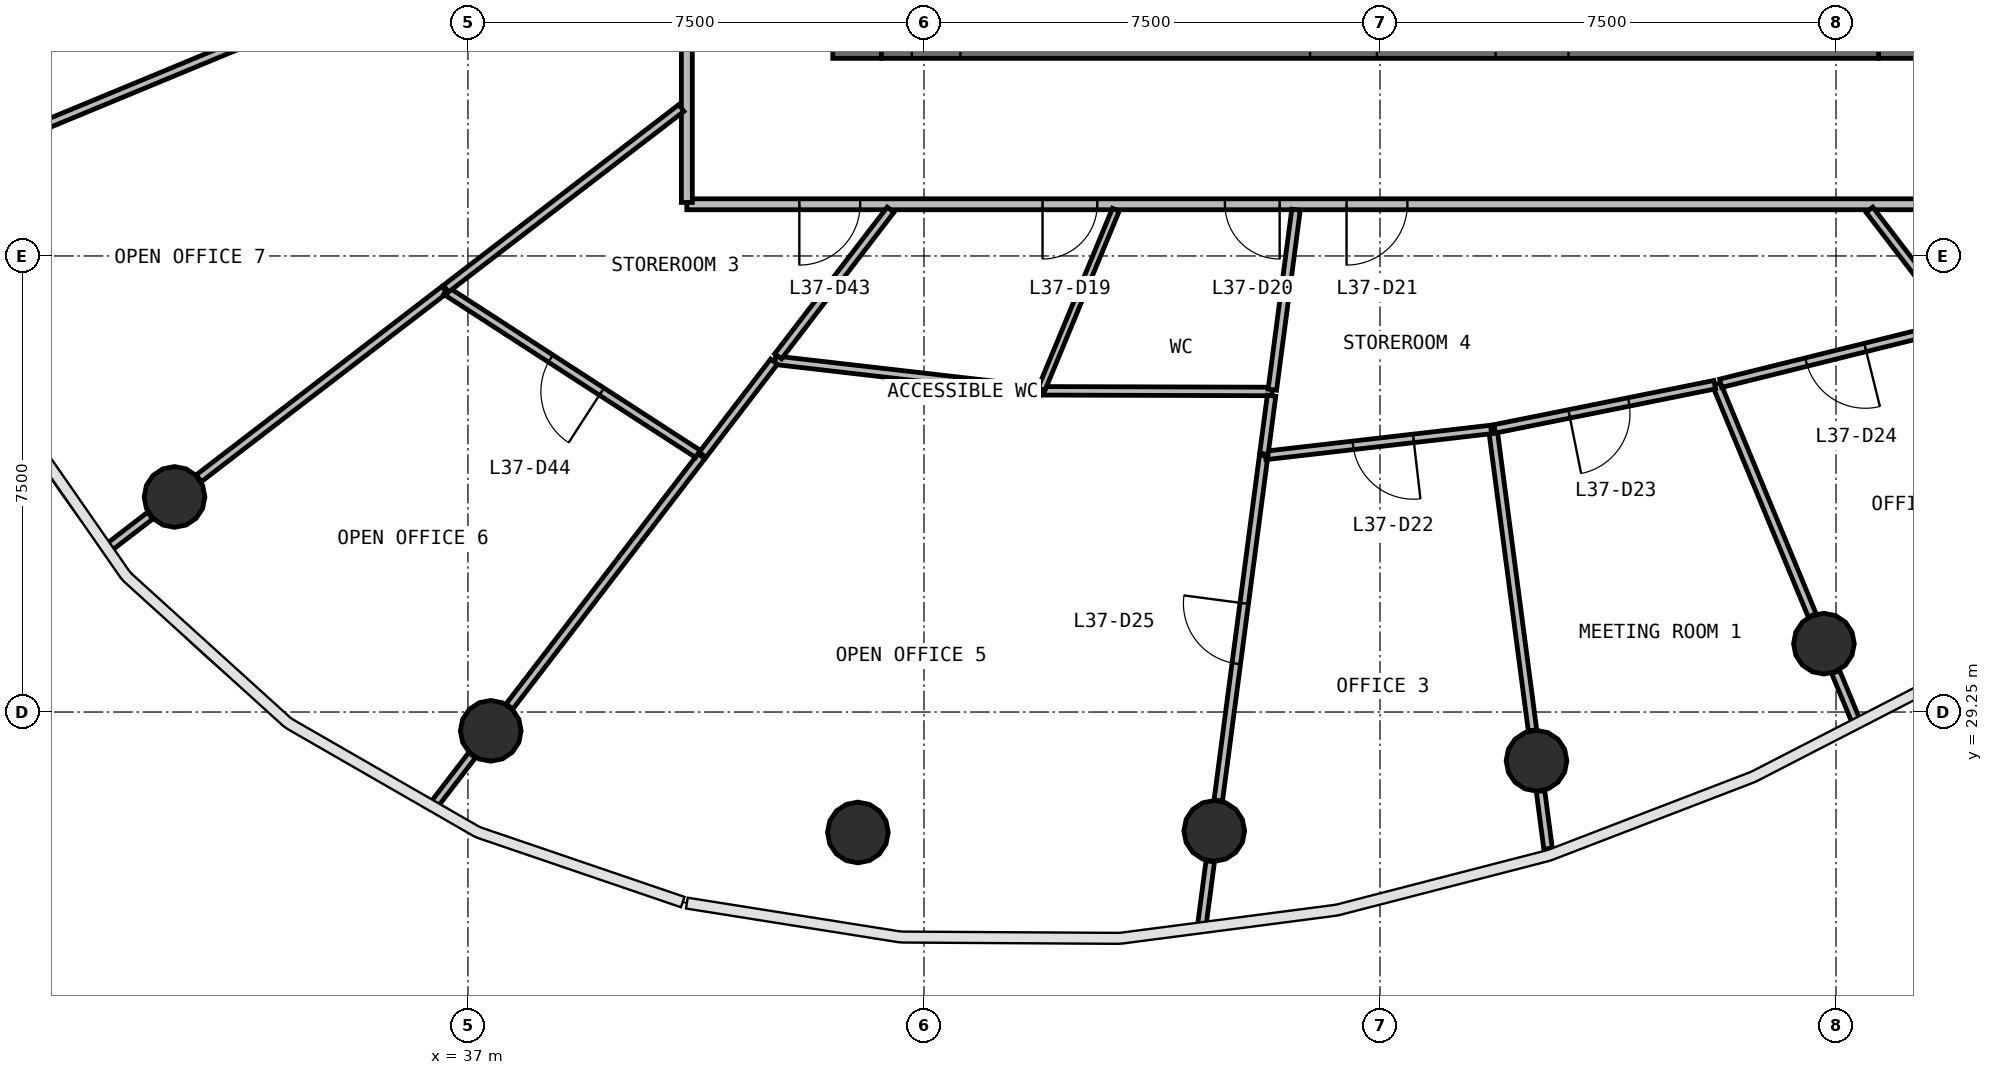
"""IFC4 building model, lengths in metres.
Left out: names, types, materials, properties, quantities, classifications, styles, units other than length and angle.
Written with IfcOpenShell. Run it as: python <this file> out.ifc"""

import sys

from ifc_helpers import new_model, si_unit, direction, frame, frame_2d, origin, origin_2d, place, context, subcontext, project, spatial, rectangle, circle, extrude, source, transform, mapped, element, fill, save


model = new_model("IFC4")
c1 = context("Model", 3, precision=1e-05, world=origin(), true_north=direction((0.0, 1.0)))
c2 = subcontext(c1, "Body", "Model", "MODEL_VIEW")
j1 = project(units=[si_unit("LENGTHUNIT", "METRE"), si_unit("PLANEANGLEUNIT", "RADIAN")], contexts=[c1])
p1 = place(None, origin())
s1 = spatial("IfcSite", under=j1, at=p1, CompositionType="ELEMENT")
p2 = place(p1, origin())
s2 = spatial("IfcBuilding", under=s1, at=p2, CompositionType="ELEMENT")
p3 = place(p2, frame((0.0, 0.0, 156.5)))
s3 = spatial("IfcBuildingStorey", under=s2, at=p3, CompositionType="ELEMENT", Elevation=156.5)
p4 = place(p3, frame((60.6, 40.0, 0.0), z_axis=(0.0, 0.0, 1.0), x_axis=(0.0, 1.0, 0.0)))
e1 = element("IfcWall", 1, at=p4, inside=s3, PredefinedType="SHEAR", context=c2, shape_type="SweptSolid", body=[
    extrude(rectangle(XDim=16.0, YDim=0.8, at=frame_2d((8.0, 0.0))), origin(), (0.0, 0.0, 1.0), 3.9),
])
p5 = place(p4, frame((7.1, 0.0, 0.0)))
e2 = element("IfcOpeningElement", 2, at=p5, cuts=e1, PredefinedType="OPENING", context=c2, shape_type="SweptSolid", body=[
    extrude(rectangle(XDim=1.8, YDim=2.1, at=frame_2d((0.9, 1.05))), frame((0.0, 0.41, 0.0), z_axis=(0.0, -1.0, 0.0), x_axis=(1.0, 0.0, 0.0)), (0.0, 0.0, 1.0), 0.82),
])
p6 = place(p3, frame((43.4, 56.0, 0.0), z_axis=(0.0, 0.0, 1.0), x_axis=(0.0, -1.0, 0.0)))
e3 = element("IfcWall", 3, at=p6, inside=s3, PredefinedType="SHEAR", context=c2, shape_type="SweptSolid", body=[
    extrude(rectangle(XDim=16.0, YDim=0.8, at=frame_2d((8.0, 0.0))), origin(), (0.0, 0.0, 1.0), 3.9),
])
p7 = place(p6, frame((7.1, 0.0, 0.0)))
e4 = element("IfcOpeningElement", 4, at=p7, cuts=e3, PredefinedType="OPENING", context=c2, shape_type="SweptSolid", body=[
    extrude(rectangle(XDim=1.8, YDim=2.1, at=frame_2d((0.9, 1.05))), frame((0.0, 0.41, 0.0), z_axis=(0.0, -1.0, 0.0), x_axis=(1.0, 0.0, 0.0)), (0.0, 0.0, 1.0), 0.82),
])
p8 = place(p3, frame((43.8, 40.4, 0.0), z_axis=(0.0, 0.0, 1.0), x_axis=(1.0, 0.0, 0.0)))
e5 = element("IfcWall", 5, at=p8, inside=s3, PredefinedType="SHEAR", context=c2, shape_type="SweptSolid", body=[
    extrude(rectangle(XDim=16.4, YDim=0.8, at=frame_2d((8.2, 0.0))), origin(), (0.0, 0.0, 1.0), 3.9),
])
p9 = place(p8, frame((10.1, 0.0, 0.0)))
e6 = element("IfcOpeningElement", 6, at=p9, cuts=e5, PredefinedType="OPENING", context=c2, shape_type="SweptSolid", body=[
    extrude(rectangle(XDim=1.2, YDim=2.1, at=frame_2d((0.6, 1.05))), frame((0.0, 0.41, 0.0), z_axis=(0.0, -1.0, 0.0), x_axis=(1.0, 0.0, 0.0)), (0.0, 0.0, 1.0), 0.82),
])
p10 = place(p8, frame((7.05, 0.0, 0.0)))
e7 = element("IfcOpeningElement", 7, at=p10, cuts=e5, PredefinedType="OPENING", context=c2, shape_type="SweptSolid", body=[
    extrude(rectangle(XDim=1.1, YDim=2.1, at=frame_2d((0.55, 1.05))), frame((0.0, 0.41, 0.0), z_axis=(0.0, -1.0, 0.0), x_axis=(1.0, 0.0, 0.0)), (0.0, 0.0, 1.0), 0.82),
])
p11 = place(p8, frame((0.5, 0.0, 0.0)))
e8 = element("IfcOpeningElement", 8, at=p11, cuts=e5, PredefinedType="OPENING", context=c2, shape_type="SweptSolid", body=[
    extrude(rectangle(XDim=0.8, YDim=2.1, at=frame_2d((0.4, 1.05))), frame((0.0, 0.41, 0.0), z_axis=(0.0, -1.0, 0.0), x_axis=(1.0, 0.0, 0.0)), (0.0, 0.0, 1.0), 0.82),
])
m1 = source(origin(), c2, "Body", "SweptSolid", [
    extrude(circle(Radius=0.5, at=origin_2d()), origin(), (0.0, 0.0, 1.0), 3.9),
])
for number, where, z_axis, x_axis in (
    (9, (32.174, 32.787, 0.0), (0.0, 0.0, 1.0), (1.0, 0.0, 0.0)),
    (10, (37.375, 28.94, 0.0), (0.0, 0.0, 1.0), (1.0, 0.0, 0.0)),
    (11, (43.413, 27.269, 0.0), (0.0, 0.0, 1.0), (1.0, 0.0, 0.0)),
    (12, (49.274, 27.295, 0.0), (0.0, 0.0, 1.0), (1.0, 0.0, 0.0)),
    (13, (54.574, 28.449, 0.0), (0.0, 0.0, 1.0), (1.0, 0.0, 0.0)),
    (14, (59.301, 30.374, 0.0), (0.0, 0.0, 1.0), (1.0, 0.0, 0.0)),
):
    element("IfcColumn", number, at=place(p3, frame(where, z_axis=z_axis, x_axis=x_axis)), inside=s3, PredefinedType="COLUMN", context=c2, shape_type="MappedRepresentation", body=[
        mapped(m1, transform((0.0, 0.0, 0.0), scale=1.0)),
    ])
p12 = place(p3, frame((63.4, 37.6, 0.0), z_axis=(0.0, 0.0, 1.0), x_axis=(-1.0, 0.0, 0.0)))
e15 = element("IfcWall", 15, at=p12, inside=s3, PredefinedType="PARTITIONING", context=c2, shape_type="SweptSolid", body=[
    extrude(rectangle(XDim=22.8, YDim=0.18, at=frame_2d((11.4, 0.0))), origin(), (0.0, 0.0, 1.0), 2.88),
])
p13 = place(p12, frame((16.05, 0.0, 0.0)))
e16 = element("IfcOpeningElement", 16, at=p13, cuts=e15, PredefinedType="OPENING", context=c2, shape_type="SweptSolid", body=[
    extrude(rectangle(XDim=0.9, YDim=2.1, at=frame_2d((0.45, 1.05))), frame((0.0, 0.1, 0.0), z_axis=(0.0, -1.0, 0.0), x_axis=(1.0, 0.0, 0.0)), (0.0, 0.0, 1.0), 0.2),
])
p14 = place(p12, frame((13.05, 0.0, 0.0)))
e17 = element("IfcOpeningElement", 17, at=p14, cuts=e15, PredefinedType="OPENING", context=c2, shape_type="SweptSolid", body=[
    extrude(rectangle(XDim=0.9, YDim=2.1, at=frame_2d((0.45, 1.05))), frame((0.0, 0.1, 0.0), z_axis=(0.0, -1.0, 0.0), x_axis=(1.0, 0.0, 0.0)), (0.0, 0.0, 1.0), 0.2),
])
p15 = place(p12, frame((10.95, 0.0, 0.0)))
e18 = element("IfcOpeningElement", 18, at=p15, cuts=e15, PredefinedType="OPENING", context=c2, shape_type="SweptSolid", body=[
    extrude(rectangle(XDim=1.0, YDim=2.1, at=frame_2d((0.5, 1.05))), frame((0.0, 0.1, 0.0), z_axis=(0.0, -1.0, 0.0), x_axis=(1.0, 0.0, 0.0)), (0.0, 0.0, 1.0), 0.2),
])
p16 = place(p12, frame((19.95, 0.0, 0.0)))
e19 = element("IfcOpeningElement", 19, at=p16, cuts=e15, PredefinedType="OPENING", context=c2, shape_type="SweptSolid", body=[
    extrude(rectangle(XDim=1.0, YDim=2.1, at=frame_2d((0.5, 1.05))), frame((0.0, 0.1, 0.0), z_axis=(0.0, -1.0, 0.0), x_axis=(1.0, 0.0, 0.0)), (0.0, 0.0, 1.0), 0.2),
])
p17 = place(p3, frame((40.6, 37.63, 0.0), z_axis=(0.0, 0.0, 1.0), x_axis=(0.0, 1.0, 0.0)))
e20 = element("IfcWall", 20, at=p17, inside=s3, PredefinedType="PARTITIONING", context=c2, shape_type="SweptSolid", body=[
    extrude(rectangle(XDim=20.74, YDim=0.18, at=frame_2d((10.37, 0.0))), origin(), (0.0, 0.0, 1.0), 2.88),
])
p18 = place(p17, frame((9.89, 0.0, 0.0)))
e21 = element("IfcOpeningElement", 21, at=p18, cuts=e20, PredefinedType="OPENING", context=c2, shape_type="SweptSolid", body=[
    extrude(rectangle(XDim=1.0, YDim=2.1, at=frame_2d((0.5, 1.05))), frame((0.0, 0.1, 0.0), z_axis=(0.0, -1.0, 0.0), x_axis=(1.0, 0.0, 0.0)), (0.0, 0.0, 1.0), 0.2),
])
p19 = place(p17, frame((4.29, 0.0, 0.0)))
e22 = element("IfcOpeningElement", 22, at=p19, cuts=e20, PredefinedType="OPENING", context=c2, shape_type="SweptSolid", body=[
    extrude(rectangle(XDim=1.0, YDim=2.1, at=frame_2d((0.5, 1.05))), frame((0.0, 0.1, 0.0), z_axis=(0.0, -1.0, 0.0), x_axis=(1.0, 0.0, 0.0)), (0.0, 0.0, 1.0), 0.2),
])
p20 = place(p3, frame((49.34, 27.795, 0.0), z_axis=(0.0, 0.0, 1.0), x_axis=(0.13055608231, 0.99144092581, 0.0)))
e23 = element("IfcWall", 23, at=p20, inside=s3, PredefinedType="PARTITIONING", context=c2, shape_type="SweptSolid", body=[
    extrude(rectangle(XDim=5.72, YDim=0.14, at=frame_2d((2.86, 0.0))), origin(), (0.0, 0.0, 1.0), 2.88),
])
p21 = place(p20, frame((2.271, 0.0, 0.0)))
e24 = element("IfcOpeningElement", 24, at=p21, cuts=e23, PredefinedType="OPENING", context=c2, shape_type="SweptSolid", body=[
    extrude(rectangle(XDim=1.0, YDim=2.1, at=frame_2d((0.5, 1.05))), frame((0.0, 0.08, 0.0), z_axis=(0.0, -1.0, 0.0), x_axis=(1.0, 0.0, 0.0)), (0.0, 0.0, 1.0), 0.16),
])
p22 = place(p3, frame((35.293, 41.08, 0.0), z_axis=(0.0, 0.0, 1.0), x_axis=(-0.923883666289, -0.38267345239, 0.0)))
e25 = element("IfcWall", 25, at=p22, inside=s3, PredefinedType="PARTITIONING", context=c2, shape_type="SweptSolid", body=[
    extrude(rectangle(XDim=5.653, YDim=0.14, at=frame_2d((2.827, 0.0))), origin(), (0.0, 0.0, 1.0), 2.88),
])
p23 = place(p3, frame((40.841, 33.457, 0.0), z_axis=(0.0, 0.0, 1.0), x_axis=(-0.608780216018, -0.793338924159, 0.0)))
e26 = element("IfcWall", 26, at=p23, inside=s3, PredefinedType="PARTITIONING", context=c2, shape_type="SweptSolid", body=[
    extrude(rectangle(XDim=5.188, YDim=0.14, at=frame_2d((2.594, 0.0))), origin(), (0.0, 0.0, 1.0), 2.88),
])
p24 = place(p3, frame((36.614, 36.194, 0.0), z_axis=(0.0, 0.0, 1.0), x_axis=(-0.79337017358, -0.608739490811, 0.0)))
e27 = element("IfcWall", 27, at=p24, inside=s3, PredefinedType="PARTITIONING", context=c2, shape_type="SweptSolid", body=[
    extrude(rectangle(XDim=5.092, YDim=0.14, at=frame_2d((2.546, 0.0))), origin(), (0.0, 0.0, 1.0), 2.88),
])
p25 = place(p3, frame((40.782, 33.495, 0.0), z_axis=(0.0, 0.0, 1.0), x_axis=(-0.839336490457, 0.543612229247, 0.0)))
e28 = element("IfcWall", 28, at=p25, inside=s3, PredefinedType="PARTITIONING", context=c2, shape_type="SweptSolid", body=[
    extrude(rectangle(XDim=4.935, YDim=0.14, at=frame_2d((2.468, 0.0))), origin(), (0.0, 0.0, 1.0), 2.88),
])
p26 = place(p25, frame((1.885, 0.0, 0.0)))
e29 = element("IfcOpeningElement", 29, at=p26, cuts=e28, PredefinedType="OPENING", context=c2, shape_type="SweptSolid", body=[
    extrude(rectangle(XDim=1.0, YDim=2.1, at=frame_2d((0.5, 1.05))), frame((0.0, 0.08, 0.0), z_axis=(0.0, -1.0, 0.0), x_axis=(1.0, 0.0, 0.0)), (0.0, 0.0, 1.0), 0.16),
])
p27 = place(p3, frame((40.51, 39.183, 0.0), z_axis=(0.0, 0.0, 1.0), x_axis=(-0.793354275357, -0.608760210405, 0.0)))
e30 = element("IfcWall", 30, at=p27, inside=s3, PredefinedType="PARTITIONING", context=c2, shape_type="SweptSolid", body=[
    extrude(rectangle(XDim=4.88, YDim=0.14, at=frame_2d((2.44, 0.0))), origin(), (0.0, 0.0, 1.0), 2.88),
])
p28 = place(p3, frame((53.856, 33.9, 0.0), z_axis=(0.0, 0.0, 1.0), x_axis=(0.130517737487, -0.991445974424, 0.0)))
e31 = element("IfcWall", 31, at=p28, inside=s3, PredefinedType="PARTITIONING", context=c2, shape_type="SweptSolid", body=[
    extrude(rectangle(XDim=4.994, YDim=0.14, at=frame_2d((2.497, 0.0))), origin(), (0.0, 0.0, 1.0), 2.88),
])
p29 = place(p3, frame((42.052, 35.035, 0.0), z_axis=(0.0, 0.0, 1.0), x_axis=(0.993448498383, -0.114280711669, 0.0)))
e32 = element("IfcWall", 32, at=p29, inside=s3, PredefinedType="PARTITIONING", context=c2, shape_type="SweptSolid", body=[
    extrude(rectangle(XDim=4.399, YDim=0.14, at=frame_2d((2.199, 0.0))), origin(), (0.0, 0.0, 1.0), 2.88),
])
p30 = place(p3, frame((57.534, 34.639, 0.0), z_axis=(0.0, 0.0, 1.0), x_axis=(0.382696163026, -0.923874259196, 0.0)))
e33 = element("IfcWall", 33, at=p30, inside=s3, PredefinedType="PARTITIONING", context=c2, shape_type="SweptSolid", body=[
    extrude(rectangle(XDim=4.112, YDim=0.14, at=frame_2d((2.056, 0.0))), origin(), (0.0, 0.0, 1.0), 2.88),
])
p31 = place(p3, frame((61.499, 35.621, 0.0), z_axis=(0.0, 0.0, 1.0), x_axis=(-0.970705214058, -0.240273567836, 0.0)))
e34 = element("IfcWall", 34, at=p31, inside=s3, PredefinedType="PARTITIONING", context=c2, shape_type="SweptSolid", body=[
    extrude(rectangle(XDim=4.014, YDim=0.14, at=frame_2d((2.007, 0.0))), origin(), (0.0, 0.0, 1.0), 2.88),
])
p32 = place(p31, frame((1.563, 0.0, 0.0)))
e35 = element("IfcOpeningElement", 35, at=p32, cuts=e34, PredefinedType="OPENING", context=c2, shape_type="SweptSolid", body=[
    extrude(rectangle(XDim=1.0, YDim=2.1, at=frame_2d((0.5, 1.05))), frame((0.0, 0.08, 0.0), z_axis=(0.0, -1.0, 0.0), x_axis=(1.0, 0.0, 0.0)), (0.0, 0.0, 1.0), 0.16),
])
p33 = place(p3, frame((46.452, 34.532, 0.0), z_axis=(0.0, 0.0, 1.0), x_axis=(0.999995948964, -0.002846411033, 0.0)))
e36 = element("IfcWall", 36, at=p33, inside=s3, PredefinedType="PARTITIONING", context=c2, shape_type="SweptSolid", body=[
    extrude(rectangle(XDim=3.774, YDim=0.14, at=frame_2d((1.887, 0.0))), origin(), (0.0, 0.0, 1.0), 2.88),
])
p34 = place(p3, frame((53.826, 33.897, 0.0), z_axis=(0.0, 0.0, 1.0), x_axis=(-0.993434107381, -0.114405744138, 0.0)))
e37 = element("IfcWall", 37, at=p34, inside=s3, PredefinedType="PARTITIONING", context=c2, shape_type="SweptSolid", body=[
    extrude(rectangle(XDim=3.734, YDim=0.14, at=frame_2d((1.867, 0.0))), origin(), (0.0, 0.0, 1.0), 2.88),
])
p35 = place(p34, frame((1.285, 0.0, 0.0)))
e38 = element("IfcOpeningElement", 38, at=p35, cuts=e37, PredefinedType="OPENING", context=c2, shape_type="SweptSolid", body=[
    extrude(rectangle(XDim=1.0, YDim=2.1, at=frame_2d((0.5, 1.05))), frame((0.0, 0.08, 0.0), z_axis=(0.0, -1.0, 0.0), x_axis=(1.0, 0.0, 0.0)), (0.0, 0.0, 1.0), 0.16),
])
p36 = place(p3, frame((57.505, 34.634, 0.0), z_axis=(0.0, 0.0, 1.0), x_axis=(-0.980399657824, -0.197019062376, 0.0)))
e39 = element("IfcWall", 39, at=p36, inside=s3, PredefinedType="PARTITIONING", context=c2, shape_type="SweptSolid", body=[
    extrude(rectangle(XDim=3.691, YDim=0.14, at=frame_2d((1.846, 0.0))), origin(), (0.0, 0.0, 1.0), 2.88),
])
p37 = place(p36, frame((1.441, 0.0, 0.0)))
e40 = element("IfcOpeningElement", 40, at=p37, cuts=e39, PredefinedType="OPENING", context=c2, shape_type="SweptSolid", body=[
    extrude(rectangle(XDim=1.0, YDim=2.1, at=frame_2d((0.5, 1.05))), frame((0.0, 0.08, 0.0), z_axis=(0.0, -1.0, 0.0), x_axis=(1.0, 0.0, 0.0)), (0.0, 0.0, 1.0), 0.16),
])
p38 = place(p3, frame((43.951, 37.51, 0.0), z_axis=(0.0, 0.0, 1.0), x_axis=(-0.608758797461, -0.793355359542, 0.0)))
e41 = element("IfcWall", 41, at=p38, inside=s3, PredefinedType="PARTITIONING", context=c2, shape_type="SweptSolid", body=[
    extrude(rectangle(XDim=3.038, YDim=0.14, at=frame_2d((1.519, 0.0))), origin(), (0.0, 0.0, 1.0), 2.88),
])
p39 = place(p3, frame((50.619, 37.51, 0.0), z_axis=(0.0, 0.0, 1.0), x_axis=(-0.13049684078, -0.991448725122, 0.0)))
e42 = element("IfcWall", 42, at=p39, inside=s3, PredefinedType="PARTITIONING", context=c2, shape_type="SweptSolid", body=[
    extrude(rectangle(XDim=2.984, YDim=0.14, at=frame_2d((1.492, 0.0))), origin(), (0.0, 0.0, 1.0), 2.88),
])
p40 = place(p3, frame((60.049, 37.51, 0.0), z_axis=(0.0, 0.0, 1.0), x_axis=(0.608742818772, -0.793367620081, 0.0)))
e43 = element("IfcWall", 43, at=p40, inside=s3, PredefinedType="PARTITIONING", context=c2, shape_type="SweptSolid", body=[
    extrude(rectangle(XDim=2.305, YDim=0.14, at=frame_2d((1.152, 0.0))), origin(), (0.0, 0.0, 1.0), 2.88),
])
p41 = place(p3, frame((42.033, 35.011, 0.0), z_axis=(0.0, 0.0, 1.0), x_axis=(-0.608750262105, -0.793361908833, 0.0)))
e44 = element("IfcWall", 44, at=p41, inside=s3, PredefinedType="PARTITIONING", context=c2, shape_type="SweptSolid", body=[
    extrude(rectangle(XDim=1.929, YDim=0.14, at=frame_2d((0.965, 0.0))), origin(), (0.0, 0.0, 1.0), 2.88),
])
p42 = place(p3, frame((50.216, 34.452, 0.0), z_axis=(0.0, 0.0, 1.0), x_axis=(-0.130454512571, -0.991454295543, 0.0)))
e45 = element("IfcWall", 45, at=p42, inside=s3, PredefinedType="PARTITIONING", context=c2, shape_type="SweptSolid", body=[
    extrude(rectangle(XDim=0.964, YDim=0.14, at=frame_2d((0.482, 0.0))), origin(), (0.0, 0.0, 1.0), 2.88),
])
p43 = place(p3, frame((49.208, 26.795, 0.0), z_axis=(0.0, 0.0, 1.0), x_axis=(-0.130569518357, -0.991439156417, 0.0)))
e46 = element("IfcWall", 46, at=p43, inside=s3, PredefinedType="PARTITIONING", context=c2, shape_type="SweptSolid", body=[
    extrude(rectangle(XDim=1.043, YDim=0.14, at=frame_2d((0.522, 0.0))), origin(), (0.0, 0.0, 1.0), 2.88),
])
p44 = place(p3, frame((37.068, 28.54, 0.0), z_axis=(0.0, 0.0, 1.0), x_axis=(-0.608815264587, -0.793312027897, 0.0)))
e47 = element("IfcWall", 47, at=p44, inside=s3, PredefinedType="PARTITIONING", context=c2, shape_type="SweptSolid", body=[
    extrude(rectangle(XDim=1.015, YDim=0.14, at=frame_2d((0.507, 0.0))), origin(), (0.0, 0.0, 1.0), 2.88),
])
p45 = place(p3, frame((54.64, 27.948, 0.0), z_axis=(0.0, 0.0, 1.0), x_axis=(0.130434626054, -0.991456911987, 0.0)))
e48 = element("IfcWall", 48, at=p45, inside=s3, PredefinedType="PARTITIONING", context=c2, shape_type="SweptSolid", body=[
    extrude(rectangle(XDim=0.953, YDim=0.14, at=frame_2d((0.476, 0.0))), origin(), (0.0, 0.0, 1.0), 2.88),
])
p46 = place(p3, frame((59.494, 29.908, 0.0), z_axis=(0.0, 0.0, 1.0), x_axis=(0.382722863119, -0.923863198772, 0.0)))
e49 = element("IfcWall", 49, at=p46, inside=s3, PredefinedType="PARTITIONING", context=c2, shape_type="SweptSolid", body=[
    extrude(rectangle(XDim=0.852, YDim=0.14, at=frame_2d((0.426, 0.0))), origin(), (0.0, 0.0, 1.0), 2.88),
])
p47 = place(p3, frame((31.774, 32.48, 0.0), z_axis=(0.0, 0.0, 1.0), x_axis=(-0.793296212725, -0.608835871871, 0.0)))
e50 = element("IfcWall", 50, at=p47, inside=s3, PredefinedType="PARTITIONING", context=c2, shape_type="SweptSolid", body=[
    extrude(rectangle(XDim=0.836, YDim=0.14, at=frame_2d((0.418, 0.0))), origin(), (0.0, 0.0, 1.0), 2.88),
])
p48 = place(p3, frame((47.655, 37.51, 0.0), z_axis=(0.0, 0.0, 1.0), x_axis=(-0.382648952505, -0.923893813783, 0.0)))
e51 = element("IfcWall", 51, at=p48, inside=s3, PredefinedType="PARTITIONING", context=c2, shape_type="SweptSolid", body=[
    extrude(rectangle(XDim=3.193, YDim=0.12, at=frame_2d((1.596, 0.0))), origin(), (0.0, 0.0, 1.0), 2.88),
])
m2 = source(origin(), c2, "Body", "SweptSolid", [
    extrude(rectangle(XDim=0.9, YDim=2.1, at=frame_2d((0.45, 1.05))), frame((0.0, 0.025, 0.0), z_axis=(0.0, -1.0, 0.0), x_axis=(1.0, 0.0, 0.0)), (0.0, 0.0, 1.0), 0.05),
])
p49 = place(p13, origin())
e52 = element("IfcDoor", 52, at=p49, inside=s3, OperationType="SINGLE_SWING_RIGHT", PredefinedType="DOOR", context=c2, shape_type="MappedRepresentation", body=[
    mapped(m2, transform((0.0, 0.0, 0.0), scale=1.0)),
])
fill(e16, e52)
p50 = place(p14, origin())
e53 = element("IfcDoor", 53, at=p50, inside=s3, OperationType="SINGLE_SWING_LEFT", PredefinedType="DOOR", context=c2, shape_type="MappedRepresentation", body=[
    mapped(m2, transform((0.0, 0.0, 0.0), scale=1.0)),
])
fill(e17, e53)
m3 = source(origin(), c2, "Body", "SweptSolid", [
    extrude(rectangle(XDim=1.0, YDim=2.1, at=frame_2d((0.5, 1.05))), frame((0.0, 0.025, 0.0), z_axis=(0.0, -1.0, 0.0), x_axis=(1.0, 0.0, 0.0)), (0.0, 0.0, 1.0), 0.05),
])
p51 = place(p15, origin())
e54 = element("IfcDoor", 54, at=p51, inside=s3, OperationType="SINGLE_SWING_RIGHT", PredefinedType="DOOR", context=c2, shape_type="MappedRepresentation", body=[
    mapped(m3, transform((0.0, 0.0, 0.0), scale=1.0)),
])
fill(e18, e54)
p52 = place(p35, origin())
e55 = element("IfcDoor", 55, at=p52, inside=s3, OperationType="SINGLE_SWING_LEFT", PredefinedType="DOOR", context=c2, shape_type="MappedRepresentation", body=[
    mapped(m3, transform((0.0, 0.0, 0.0), scale=1.0)),
])
fill(e38, e55)
p53 = place(p37, origin())
e56 = element("IfcDoor", 56, at=p53, inside=s3, OperationType="SINGLE_SWING_RIGHT", PredefinedType="DOOR", context=c2, shape_type="MappedRepresentation", body=[
    mapped(m3, transform((0.0, 0.0, 0.0), scale=1.0)),
])
fill(e40, e56)
p54 = place(p32, origin())
e57 = element("IfcDoor", 57, at=p54, inside=s3, OperationType="SINGLE_SWING_LEFT", PredefinedType="DOOR", context=c2, shape_type="MappedRepresentation", body=[
    mapped(m3, transform((0.0, 0.0, 0.0), scale=1.0)),
])
fill(e35, e57)
p55 = place(p21, origin())
e58 = element("IfcDoor", 58, at=p55, inside=s3, OperationType="SINGLE_SWING_RIGHT", PredefinedType="DOOR", context=c2, shape_type="MappedRepresentation", body=[
    mapped(m3, transform((0.0, 0.0, 0.0), scale=1.0)),
])
fill(e24, e58)
p56 = place(p16, origin())
e59 = element("IfcDoor", 59, at=p56, inside=s3, OperationType="SINGLE_SWING_RIGHT", PredefinedType="DOOR", context=c2, shape_type="MappedRepresentation", body=[
    mapped(m3, transform((0.0, 0.0, 0.0), scale=1.0)),
])
fill(e19, e59)
p57 = place(p26, origin())
e60 = element("IfcDoor", 60, at=p57, inside=s3, OperationType="SINGLE_SWING_LEFT", PredefinedType="DOOR", context=c2, shape_type="MappedRepresentation", body=[
    mapped(m3, transform((0.0, 0.0, 0.0), scale=1.0)),
])
fill(e29, e60)
save(model, sys.argv[1])
